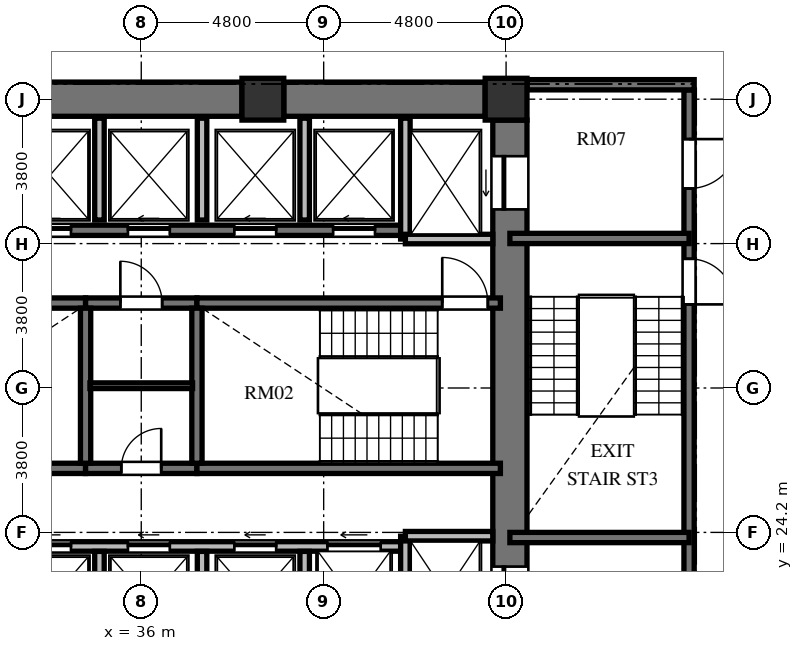
"""IFC4 building model, lengths in metres.
Left out: names, types, materials, properties, quantities, classifications, styles, units other than length and angle.
Written with IfcOpenShell. Run it as: python <this file> out.ifc"""

import sys

from ifc_helpers import new_model, si_unit, direction, frame, frame_2d, origin, origin_2d, place, context, subcontext, project, spatial, rectangle, extrude, element, fill, save


model = new_model("IFC4")
c1 = context("Model", 3, precision=1e-05, world=origin(), true_north=direction((0.0, 1.0)))
c2 = subcontext(c1, "Body", "Model", "MODEL_VIEW")
j1 = project(units=[si_unit("LENGTHUNIT", "METRE"), si_unit("PLANEANGLEUNIT", "RADIAN")], contexts=[c1])
p1 = place(None, origin())
s1 = spatial("IfcSite", under=j1, at=p1, CompositionType="ELEMENT")
p2 = place(p1, origin())
s2 = spatial("IfcBuilding", under=s1, at=p2, CompositionType="ELEMENT")
p3 = place(p2, frame((0.0, 0.0, 58.032)))
s3 = spatial("IfcBuildingStorey", under=s2, at=p3, CompositionType="ELEMENT", Elevation=58.032)
for number, where, z_axis, x_axis in (
    (1, (45.6, 35.6, 0.0), (0.0, 0.0, 1.0), (1.0, 0.0, 0.0)),
    (2, (39.2, 35.6, 0.0), (0.0, 0.0, 1.0), (1.0, 0.0, 0.0)),
):
    element("IfcColumn", number, at=place(p3, frame(where, z_axis=z_axis, x_axis=x_axis)), inside=s3, PredefinedType="COLUMN", context=c2, shape_type="SweptSolid", body=[
        extrude(rectangle(XDim=1.1, YDim=1.1, at=origin_2d()), origin(), (0.0, 0.0, 1.0), 3.648),
    ])
p4 = place(p3, frame((45.7, 20.95, 0.0), z_axis=(0.0, 0.0, 1.0), x_axis=(0.0, 1.0, 0.0)))
e3 = element("IfcWall", 3, at=p4, inside=s3, PredefinedType="SHEAR", context=c2, shape_type="SweptSolid", body=[
    extrude(rectangle(XDim=14.1, YDim=0.9, at=frame_2d((7.05, 0.0))), origin(), (0.0, 0.0, 1.0), 3.648),
])
p5 = place(p4, frame((11.75, 0.0, 0.0)))
e4 = element("IfcOpeningElement", 4, at=p5, cuts=e3, PredefinedType="OPENING", context=c2, shape_type="SweptSolid", body=[
    extrude(rectangle(XDim=1.4, YDim=2.3, at=frame_2d((0.7, 1.15))), frame((0.0, 0.46, 0.0), z_axis=(0.0, -1.0, 0.0), x_axis=(1.0, 0.0, 0.0)), (0.0, 0.0, 1.0), 0.92),
])
p6 = place(p4, frame((0.95, 0.0, 0.0)))
e5 = element("IfcOpeningElement", 5, at=p6, cuts=e3, PredefinedType="OPENING", context=c2, shape_type="SweptSolid", body=[
    extrude(rectangle(XDim=1.4, YDim=2.3, at=frame_2d((0.7, 1.15))), frame((0.0, 0.46, 0.0), z_axis=(0.0, -1.0, 0.0), x_axis=(1.0, 0.0, 0.0)), (0.0, 0.0, 1.0), 0.92),
])
p7 = place(p3, frame((33.35, 35.6, 0.0), z_axis=(0.0, 0.0, 1.0), x_axis=(1.0, 0.0, 0.0)))
e6 = element("IfcWall", 6, at=p7, inside=s3, PredefinedType="SHEAR", context=c2, shape_type="SweptSolid", body=[
    extrude(rectangle(XDim=5.3, YDim=0.9, at=frame_2d((2.65, 0.0))), origin(), (0.0, 0.0, 1.0), 3.648),
])
p8 = place(p3, frame((39.75, 35.6, 0.0), z_axis=(0.0, 0.0, 1.0), x_axis=(1.0, 0.0, 0.0)))
e7 = element("IfcWall", 7, at=p8, inside=s3, PredefinedType="SHEAR", context=c2, shape_type="SweptSolid", body=[
    extrude(rectangle(XDim=5.3, YDim=0.9, at=frame_2d((2.65, 0.0))), origin(), (0.0, 0.0, 1.0), 3.648),
])
p9 = place(p3, frame((26.55, 30.235, 0.0), z_axis=(0.0, 0.0, 1.0), x_axis=(1.0, 0.0, 0.0)))
e8 = element("IfcWall", 8, at=p9, inside=s3, PredefinedType="SHEAR", context=c2, shape_type="SweptSolid", body=[
    extrude(rectangle(XDim=7.985, YDim=0.27, at=frame_2d((3.992, 0.0))), origin(), (0.0, 0.0, 1.0), 3.648),
])
p10 = place(p3, frame((34.535, 30.235, 0.0), z_axis=(0.0, 0.0, 1.0), x_axis=(1.0, 0.0, 0.0)))
e9 = element("IfcWall", 9, at=p10, inside=s3, PredefinedType="SHEAR", context=c2, shape_type="SweptSolid", body=[
    extrude(rectangle(XDim=2.93, YDim=0.27, at=frame_2d((1.465, 0.0))), origin(), (0.0, 0.0, 1.0), 3.648),
])
p11 = place(p10, frame((0.915, 0.0, 0.0)))
e10 = element("IfcOpeningElement", 10, at=p11, cuts=e9, PredefinedType="OPENING", context=c2, shape_type="SweptSolid", body=[
    extrude(rectangle(XDim=1.1, YDim=2.15, at=frame_2d((0.55, 1.075))), frame((0.0, 0.145, 0.0), z_axis=(0.0, -1.0, 0.0), x_axis=(1.0, 0.0, 0.0)), (0.0, 0.0, 1.0), 0.29),
])
p12 = place(p3, frame((37.465, 30.235, 0.0), z_axis=(0.0, 0.0, 1.0), x_axis=(1.0, 0.0, 0.0)))
e11 = element("IfcWall", 11, at=p12, inside=s3, PredefinedType="SHEAR", context=c2, shape_type="SweptSolid", body=[
    extrude(rectangle(XDim=7.985, YDim=0.27, at=frame_2d((3.992, 0.0))), origin(), (0.0, 0.0, 1.0), 3.648),
])
p13 = place(p12, frame((6.455, 0.0, 0.0)))
e12 = element("IfcOpeningElement", 12, at=p13, cuts=e11, PredefinedType="OPENING", context=c2, shape_type="SweptSolid", body=[
    extrude(rectangle(XDim=1.2, YDim=2.15, at=frame_2d((0.6, 1.075))), frame((0.0, 0.145, 0.0), z_axis=(0.0, -1.0, 0.0), x_axis=(1.0, 0.0, 0.0)), (0.0, 0.0, 1.0), 0.29),
])
p14 = place(p3, frame((26.55, 25.885, 0.0), z_axis=(0.0, 0.0, 1.0), x_axis=(1.0, 0.0, 0.0)))
e13 = element("IfcWall", 13, at=p14, inside=s3, PredefinedType="SHEAR", context=c2, shape_type="SweptSolid", body=[
    extrude(rectangle(XDim=7.985, YDim=0.27, at=frame_2d((3.992, 0.0))), origin(), (0.0, 0.0, 1.0), 3.648),
])
p15 = place(p3, frame((34.535, 25.885, 0.0), z_axis=(0.0, 0.0, 1.0), x_axis=(1.0, 0.0, 0.0)))
e14 = element("IfcWall", 14, at=p15, inside=s3, PredefinedType="SHEAR", context=c2, shape_type="SweptSolid", body=[
    extrude(rectangle(XDim=2.93, YDim=0.27, at=frame_2d((1.465, 0.0))), origin(), (0.0, 0.0, 1.0), 3.648),
])
p16 = place(p15, frame((0.94, 0.0, 0.0)))
e15 = element("IfcOpeningElement", 15, at=p16, cuts=e14, PredefinedType="OPENING", context=c2, shape_type="SweptSolid", body=[
    extrude(rectangle(XDim=1.05, YDim=2.15, at=frame_2d((0.525, 1.075))), frame((0.0, 0.145, 0.0), z_axis=(0.0, -1.0, 0.0), x_axis=(1.0, 0.0, 0.0)), (0.0, 0.0, 1.0), 0.29),
])
p17 = place(p3, frame((37.465, 25.885, 0.0), z_axis=(0.0, 0.0, 1.0), x_axis=(1.0, 0.0, 0.0)))
e16 = element("IfcWall", 16, at=p17, inside=s3, PredefinedType="SHEAR", context=c2, shape_type="SweptSolid", body=[
    extrude(rectangle(XDim=7.985, YDim=0.27, at=frame_2d((3.992, 0.0))), origin(), (0.0, 0.0, 1.0), 3.648),
])
for number, where, z_axis, x_axis in (
    (17, (34.535, 26.02, 0.0), (0.0, 0.0, 1.0), (0.0, 1.0, 0.0)),
    (18, (37.465, 26.02, 0.0), (0.0, 0.0, 1.0), (0.0, 1.0, 0.0)),
):
    element("IfcWall", number, at=place(p3, frame(where, z_axis=z_axis, x_axis=x_axis)), inside=s3, PredefinedType="SHEAR", context=c2, shape_type="SweptSolid", body=[
        extrude(rectangle(XDim=4.08, YDim=0.27, at=frame_2d((2.04, 0.0))), origin(), (0.0, 0.0, 1.0), 3.648),
    ])
p18 = place(p3, frame((34.65, 28.06, 0.0), z_axis=(0.0, 0.0, 1.0), x_axis=(1.0, 0.0, 0.0)))
e19 = element("IfcWall", 19, at=p18, inside=s3, PredefinedType="PARTITIONING", context=c2, shape_type="SweptSolid", body=[
    extrude(rectangle(XDim=2.7, YDim=0.15, at=frame_2d((1.35, 0.0))), origin(), (0.0, 0.0, 1.0), 3.428),
])
p19 = place(p3, frame((26.55, 32.15, 0.0), z_axis=(0.0, 0.0, 1.0), x_axis=(1.0, 0.0, 0.0)))
e20 = element("IfcWall", 20, at=p19, inside=s3, PredefinedType="SHEAR", context=c2, shape_type="SweptSolid", body=[
    extrude(rectangle(XDim=16.4, YDim=0.27, at=frame_2d((8.2, 0.0))), origin(), (0.0, 0.0, 1.0), 3.648),
])
p20 = place(p19, frame((1.1, 0.0, 0.0)))
e21 = element("IfcOpeningElement", 21, at=p20, cuts=e20, PredefinedType="OPENING", context=c2, shape_type="SweptSolid", body=[
    extrude(rectangle(XDim=1.1, YDim=2.2, at=frame_2d((0.55, 1.1))), frame((0.0, 0.145, 0.0), z_axis=(0.0, -1.0, 0.0), x_axis=(1.0, 0.0, 0.0)), (0.0, 0.0, 1.0), 0.29),
])
p21 = place(p19, frame((3.7, 0.0, 0.0)))
e22 = element("IfcOpeningElement", 22, at=p21, cuts=e20, PredefinedType="OPENING", context=c2, shape_type="SweptSolid", body=[
    extrude(rectangle(XDim=1.1, YDim=2.2, at=frame_2d((0.55, 1.1))), frame((0.0, 0.145, 0.0), z_axis=(0.0, -1.0, 0.0), x_axis=(1.0, 0.0, 0.0)), (0.0, 0.0, 1.0), 0.29),
])
p22 = place(p19, frame((6.5, 0.0, 0.0)))
e23 = element("IfcOpeningElement", 23, at=p22, cuts=e20, PredefinedType="OPENING", context=c2, shape_type="SweptSolid", body=[
    extrude(rectangle(XDim=1.1, YDim=2.2, at=frame_2d((0.55, 1.1))), frame((0.0, 0.145, 0.0), z_axis=(0.0, -1.0, 0.0), x_axis=(1.0, 0.0, 0.0)), (0.0, 0.0, 1.0), 0.29),
])
p23 = place(p19, frame((9.1, 0.0, 0.0)))
e24 = element("IfcOpeningElement", 24, at=p23, cuts=e20, PredefinedType="OPENING", context=c2, shape_type="SweptSolid", body=[
    extrude(rectangle(XDim=1.1, YDim=2.2, at=frame_2d((0.55, 1.1))), frame((0.0, 0.145, 0.0), z_axis=(0.0, -1.0, 0.0), x_axis=(1.0, 0.0, 0.0)), (0.0, 0.0, 1.0), 0.29),
])
p24 = place(p19, frame((11.9, 0.0, 0.0)))
e25 = element("IfcOpeningElement", 25, at=p24, cuts=e20, PredefinedType="OPENING", context=c2, shape_type="SweptSolid", body=[
    extrude(rectangle(XDim=1.1, YDim=2.2, at=frame_2d((0.55, 1.1))), frame((0.0, 0.145, 0.0), z_axis=(0.0, -1.0, 0.0), x_axis=(1.0, 0.0, 0.0)), (0.0, 0.0, 1.0), 0.29),
])
p25 = place(p19, frame((14.5, 0.0, 0.0)))
e26 = element("IfcOpeningElement", 26, at=p25, cuts=e20, PredefinedType="OPENING", context=c2, shape_type="SweptSolid", body=[
    extrude(rectangle(XDim=1.1, YDim=2.2, at=frame_2d((0.55, 1.1))), frame((0.0, 0.145, 0.0), z_axis=(0.0, -1.0, 0.0), x_axis=(1.0, 0.0, 0.0)), (0.0, 0.0, 1.0), 0.29),
])
p26 = place(p3, frame((26.75, 23.83, 0.0), z_axis=(0.0, 0.0, 1.0), x_axis=(1.0, 0.0, 0.0)))
e27 = element("IfcWall", 27, at=p26, inside=s3, PredefinedType="SOLIDWALL", context=c2, shape_type="SweptSolid", body=[
    extrude(rectangle(XDim=16.2, YDim=0.25, at=frame_2d((8.1, 0.0))), origin(), (0.0, 0.0, 1.0), 3.428),
])
p27 = place(p26, frame((0.9, 0.0, 0.0)))
e28 = element("IfcOpeningElement", 28, at=p27, cuts=e27, PredefinedType="OPENING", context=c2, shape_type="SweptSolid", body=[
    extrude(rectangle(XDim=1.1, YDim=2.2, at=frame_2d((0.55, 1.1))), frame((0.0, 0.135, 0.0), z_axis=(0.0, -1.0, 0.0), x_axis=(1.0, 0.0, 0.0)), (0.0, 0.0, 1.0), 0.27),
])
p28 = place(p26, frame((3.5, 0.0, 0.0)))
e29 = element("IfcOpeningElement", 29, at=p28, cuts=e27, PredefinedType="OPENING", context=c2, shape_type="SweptSolid", body=[
    extrude(rectangle(XDim=1.1, YDim=2.2, at=frame_2d((0.55, 1.1))), frame((0.0, 0.135, 0.0), z_axis=(0.0, -1.0, 0.0), x_axis=(1.0, 0.0, 0.0)), (0.0, 0.0, 1.0), 0.27),
])
p29 = place(p26, frame((6.3, 0.0, 0.0)))
e30 = element("IfcOpeningElement", 30, at=p29, cuts=e27, PredefinedType="OPENING", context=c2, shape_type="SweptSolid", body=[
    extrude(rectangle(XDim=1.1, YDim=2.2, at=frame_2d((0.55, 1.1))), frame((0.0, 0.135, 0.0), z_axis=(0.0, -1.0, 0.0), x_axis=(1.0, 0.0, 0.0)), (0.0, 0.0, 1.0), 0.27),
])
p30 = place(p26, frame((8.9, 0.0, 0.0)))
e31 = element("IfcOpeningElement", 31, at=p30, cuts=e27, PredefinedType="OPENING", context=c2, shape_type="SweptSolid", body=[
    extrude(rectangle(XDim=1.1, YDim=2.2, at=frame_2d((0.55, 1.1))), frame((0.0, 0.135, 0.0), z_axis=(0.0, -1.0, 0.0), x_axis=(1.0, 0.0, 0.0)), (0.0, 0.0, 1.0), 0.27),
])
p31 = place(p26, frame((11.7, 0.0, 0.0)))
e32 = element("IfcOpeningElement", 32, at=p31, cuts=e27, PredefinedType="OPENING", context=c2, shape_type="SweptSolid", body=[
    extrude(rectangle(XDim=1.1, YDim=2.2, at=frame_2d((0.55, 1.1))), frame((0.0, 0.135, 0.0), z_axis=(0.0, -1.0, 0.0), x_axis=(1.0, 0.0, 0.0)), (0.0, 0.0, 1.0), 0.27),
])
p32 = place(p26, frame((14.15, 0.0, 0.0)))
e33 = element("IfcOpeningElement", 33, at=p32, cuts=e27, PredefinedType="OPENING", context=c2, shape_type="SweptSolid", body=[
    extrude(rectangle(XDim=1.4, YDim=2.3, at=frame_2d((0.7, 1.15))), frame((0.0, 0.135, 0.0), z_axis=(0.0, -1.0, 0.0), x_axis=(1.0, 0.0, 0.0)), (0.0, 0.0, 1.0), 0.27),
])
p33 = place(p3, frame((42.95, 31.92, 0.0), z_axis=(0.0, 0.0, 1.0), x_axis=(0.0, 1.0, 0.0)))
e34 = element("IfcWall", 34, at=p33, inside=s3, PredefinedType="SOLIDWALL", context=c2, shape_type="SweptSolid", body=[
    extrude(rectangle(XDim=3.18, YDim=0.25, at=frame_2d((1.59, 0.0))), origin(), (0.0, 0.0, 1.0), 3.428),
])
p34 = place(p3, frame((42.95, 31.92, 0.0), z_axis=(0.0, 0.0, 1.0), x_axis=(1.0, 0.0, 0.0)))
e35 = element("IfcWall", 35, at=p34, inside=s3, PredefinedType="SOLIDWALL", context=c2, shape_type="SweptSolid", body=[
    extrude(rectangle(XDim=2.3, YDim=0.25, at=frame_2d((1.15, 0.0))), origin(), (0.0, 0.0, 1.0), 3.428),
])
p35 = place(p3, frame((42.95, 20.9, 0.0), z_axis=(0.0, 0.0, 1.0), x_axis=(0.0, 1.0, 0.0)))
e36 = element("IfcWall", 36, at=p35, inside=s3, PredefinedType="SOLIDWALL", context=c2, shape_type="SweptSolid", body=[
    extrude(rectangle(XDim=3.2, YDim=0.25, at=frame_2d((1.6, 0.0))), origin(), (0.0, 0.0, 1.0), 3.428),
])
p36 = place(p3, frame((42.95, 24.1, 0.0), z_axis=(0.0, 0.0, 1.0), x_axis=(1.0, 0.0, 0.0)))
e37 = element("IfcWall", 37, at=p36, inside=s3, PredefinedType="SOLIDWALL", context=c2, shape_type="SweptSolid", body=[
    extrude(rectangle(XDim=2.3, YDim=0.25, at=frame_2d((1.15, 0.0))), origin(), (0.0, 0.0, 1.0), 3.428),
])
p37 = place(p3, frame((34.9, 32.42, 0.0), z_axis=(0.0, 0.0, 1.0), x_axis=(0.0, 1.0, 0.0)))
e38 = element("IfcWall", 38, at=p37, inside=s3, PredefinedType="SOLIDWALL", context=c2, shape_type="SweptSolid", body=[
    extrude(rectangle(XDim=2.68, YDim=0.25, at=frame_2d((1.34, 0.0))), origin(), (0.0, 0.0, 1.0), 3.428),
])
p38 = place(p3, frame((34.9, 20.9, 0.0), z_axis=(0.0, 0.0, 1.0), x_axis=(0.0, 1.0, 0.0)))
e39 = element("IfcWall", 39, at=p38, inside=s3, PredefinedType="SOLIDWALL", context=c2, shape_type="SweptSolid", body=[
    extrude(rectangle(XDim=2.8, YDim=0.25, at=frame_2d((1.4, 0.0))), origin(), (0.0, 0.0, 1.0), 3.428),
])
p39 = place(p3, frame((37.6, 32.42, 0.0), z_axis=(0.0, 0.0, 1.0), x_axis=(0.0, 1.0, 0.0)))
e40 = element("IfcWall", 40, at=p39, inside=s3, PredefinedType="SOLIDWALL", context=c2, shape_type="SweptSolid", body=[
    extrude(rectangle(XDim=2.68, YDim=0.25, at=frame_2d((1.34, 0.0))), origin(), (0.0, 0.0, 1.0), 3.428),
])
p40 = place(p3, frame((37.6, 20.9, 0.0), z_axis=(0.0, 0.0, 1.0), x_axis=(0.0, 1.0, 0.0)))
e41 = element("IfcWall", 41, at=p40, inside=s3, PredefinedType="SOLIDWALL", context=c2, shape_type="SweptSolid", body=[
    extrude(rectangle(XDim=2.8, YDim=0.25, at=frame_2d((1.4, 0.0))), origin(), (0.0, 0.0, 1.0), 3.428),
])
p41 = place(p3, frame((40.3, 32.42, 0.0), z_axis=(0.0, 0.0, 1.0), x_axis=(0.0, 1.0, 0.0)))
e42 = element("IfcWall", 42, at=p41, inside=s3, PredefinedType="SOLIDWALL", context=c2, shape_type="SweptSolid", body=[
    extrude(rectangle(XDim=2.68, YDim=0.25, at=frame_2d((1.34, 0.0))), origin(), (0.0, 0.0, 1.0), 3.428),
])
p42 = place(p3, frame((40.3, 20.9, 0.0), z_axis=(0.0, 0.0, 1.0), x_axis=(0.0, 1.0, 0.0)))
e43 = element("IfcWall", 43, at=p42, inside=s3, PredefinedType="SOLIDWALL", context=c2, shape_type="SweptSolid", body=[
    extrude(rectangle(XDim=2.8, YDim=0.25, at=frame_2d((1.4, 0.0))), origin(), (0.0, 0.0, 1.0), 3.428),
])
p43 = place(p3, frame((50.415, 35.845, 0.0), z_axis=(0.0, 0.0, 1.0), x_axis=(0.0, -1.0, 0.0)))
e44 = element("IfcWall", 44, at=p43, inside=s3, PredefinedType="SHEAR", context=c2, shape_type="SweptSolid", body=[
    extrude(rectangle(XDim=15.825, YDim=0.27, at=frame_2d((7.913, 0.0))), origin(), (0.0, 0.0, 1.0), 3.648),
])
p44 = place(p43, frame((4.445, 0.0, 0.0)))
e45 = element("IfcOpeningElement", 45, at=p44, cuts=e44, PredefinedType="OPENING", context=c2, shape_type="SweptSolid", body=[
    extrude(rectangle(XDim=1.2, YDim=2.15, at=frame_2d((0.6, 1.075))), frame((0.0, 0.145, 0.0), z_axis=(0.0, -1.0, 0.0), x_axis=(1.0, 0.0, 0.0)), (0.0, 0.0, 1.0), 0.29),
])
p45 = place(p43, frame((1.295, 0.0, 0.0)))
e46 = element("IfcOpeningElement", 46, at=p45, cuts=e44, PredefinedType="OPENING", context=c2, shape_type="SweptSolid", body=[
    extrude(rectangle(XDim=1.3, YDim=2.2, at=frame_2d((0.65, 1.1))), frame((0.0, 0.145, 0.0), z_axis=(0.0, -1.0, 0.0), x_axis=(1.0, 0.0, 0.0)), (0.0, 0.0, 1.0), 0.29),
])
p46 = place(p43, frame((13.095, 0.0, 0.0)))
e47 = element("IfcOpeningElement", 47, at=p46, cuts=e44, PredefinedType="OPENING", context=c2, shape_type="SweptSolid", body=[
    extrude(rectangle(XDim=1.3, YDim=2.2, at=frame_2d((0.65, 1.1))), frame((0.0, 0.145, 0.0), z_axis=(0.0, -1.0, 0.0), x_axis=(1.0, 0.0, 0.0)), (0.0, 0.0, 1.0), 0.29),
])
p47 = place(p3, frame((46.15, 35.98, 0.0), z_axis=(0.0, 0.0, 1.0), x_axis=(1.0, 0.0, 0.0)))
e48 = element("IfcWall", 48, at=p47, inside=s3, PredefinedType="SHEAR", context=c2, shape_type="SweptSolid", body=[
    extrude(rectangle(XDim=4.4, YDim=0.27, at=frame_2d((2.2, 0.0))), origin(), (0.0, 0.0, 1.0), 3.648),
])
for number, where, z_axis, x_axis in (
    (49, (45.7, 31.935, 0.0), (0.0, 0.0, 1.0), (1.0, 0.0, 0.0)),
    (50, (45.7, 24.065, 0.0), (0.0, 0.0, 1.0), (1.0, 0.0, 0.0)),
):
    element("IfcWall", number, at=place(p3, frame(where, z_axis=z_axis, x_axis=x_axis)), inside=s3, PredefinedType="SHEAR", context=c2, shape_type="SweptSolid", body=[
        extrude(rectangle(XDim=4.715, YDim=0.27, at=frame_2d((2.357, 0.0))), origin(), (0.0, 0.0, 1.0), 3.648),
    ])
p48 = place(p13, origin())
e51 = element("IfcDoor", 51, at=p48, inside=s3, OperationType="SINGLE_SWING_LEFT", PredefinedType="DOOR", context=c2, shape_type="SweptSolid", body=[
    extrude(rectangle(XDim=1.2, YDim=2.15, at=frame_2d((0.6, 1.075))), frame((0.0, 0.025, 0.0), z_axis=(0.0, -1.0, 0.0), x_axis=(1.0, 0.0, 0.0)), (0.0, 0.0, 1.0), 0.05),
])
fill(e12, e51)
p49 = place(p16, origin())
e52 = element("IfcDoor", 52, at=p49, inside=s3, OperationType="SINGLE_SWING_RIGHT", PredefinedType="DOOR", context=c2, shape_type="SweptSolid", body=[
    extrude(rectangle(XDim=1.05, YDim=2.15, at=frame_2d((0.525, 1.075))), frame((0.0, 0.025, 0.0), z_axis=(0.0, -1.0, 0.0), x_axis=(1.0, 0.0, 0.0)), (0.0, 0.0, 1.0), 0.05),
])
fill(e15, e52)
p50 = place(p11, origin())
e53 = element("IfcDoor", 53, at=p50, inside=s3, OperationType="SINGLE_SWING_LEFT", PredefinedType="DOOR", context=c2, shape_type="SweptSolid", body=[
    extrude(rectangle(XDim=1.1, YDim=2.15, at=frame_2d((0.55, 1.075))), frame((0.0, 0.025, 0.0), z_axis=(0.0, -1.0, 0.0), x_axis=(1.0, 0.0, 0.0)), (0.0, 0.0, 1.0), 0.05),
])
fill(e10, e53)
p51 = place(p22, origin())
e54 = element("IfcDoor", 54, at=p51, inside=s3, OperationType="SLIDING_TO_LEFT", PredefinedType="DOOR", context=c2, shape_type="SweptSolid", body=[
    extrude(rectangle(XDim=1.1, YDim=2.2, at=frame_2d((0.55, 1.1))), frame((0.0, 0.025, 0.0), z_axis=(0.0, -1.0, 0.0), x_axis=(1.0, 0.0, 0.0)), (0.0, 0.0, 1.0), 0.05),
])
fill(e23, e54)
p52 = place(p23, origin())
e55 = element("IfcDoor", 55, at=p52, inside=s3, OperationType="SLIDING_TO_LEFT", PredefinedType="DOOR", context=c2, shape_type="SweptSolid", body=[
    extrude(rectangle(XDim=1.1, YDim=2.2, at=frame_2d((0.55, 1.1))), frame((0.0, 0.025, 0.0), z_axis=(0.0, -1.0, 0.0), x_axis=(1.0, 0.0, 0.0)), (0.0, 0.0, 1.0), 0.05),
])
fill(e24, e55)
p53 = place(p29, origin())
e56 = element("IfcDoor", 56, at=p53, inside=s3, OperationType="SLIDING_TO_LEFT", PredefinedType="DOOR", context=c2, shape_type="SweptSolid", body=[
    extrude(rectangle(XDim=1.1, YDim=2.2, at=frame_2d((0.55, 1.1))), frame((0.0, 0.025, 0.0), z_axis=(0.0, -1.0, 0.0), x_axis=(1.0, 0.0, 0.0)), (0.0, 0.0, 1.0), 0.05),
])
fill(e30, e56)
p54 = place(p30, origin())
e57 = element("IfcDoor", 57, at=p54, inside=s3, OperationType="SLIDING_TO_LEFT", PredefinedType="DOOR", context=c2, shape_type="SweptSolid", body=[
    extrude(rectangle(XDim=1.1, YDim=2.2, at=frame_2d((0.55, 1.1))), frame((0.0, 0.025, 0.0), z_axis=(0.0, -1.0, 0.0), x_axis=(1.0, 0.0, 0.0)), (0.0, 0.0, 1.0), 0.05),
])
fill(e31, e57)
p55 = place(p24, origin())
e58 = element("IfcDoor", 58, at=p55, inside=s3, OperationType="SLIDING_TO_LEFT", PredefinedType="DOOR", context=c2, shape_type="SweptSolid", body=[
    extrude(rectangle(XDim=1.1, YDim=2.2, at=frame_2d((0.55, 1.1))), frame((0.0, 0.025, 0.0), z_axis=(0.0, -1.0, 0.0), x_axis=(1.0, 0.0, 0.0)), (0.0, 0.0, 1.0), 0.05),
])
fill(e25, e58)
p56 = place(p25, origin())
e59 = element("IfcDoor", 59, at=p56, inside=s3, OperationType="SLIDING_TO_LEFT", PredefinedType="DOOR", context=c2, shape_type="SweptSolid", body=[
    extrude(rectangle(XDim=1.1, YDim=2.2, at=frame_2d((0.55, 1.1))), frame((0.0, 0.025, 0.0), z_axis=(0.0, -1.0, 0.0), x_axis=(1.0, 0.0, 0.0)), (0.0, 0.0, 1.0), 0.05),
])
fill(e26, e59)
p57 = place(p31, origin())
e60 = element("IfcDoor", 60, at=p57, inside=s3, OperationType="SLIDING_TO_LEFT", PredefinedType="DOOR", context=c2, shape_type="SweptSolid", body=[
    extrude(rectangle(XDim=1.1, YDim=2.2, at=frame_2d((0.55, 1.1))), frame((0.0, 0.025, 0.0), z_axis=(0.0, -1.0, 0.0), x_axis=(1.0, 0.0, 0.0)), (0.0, 0.0, 1.0), 0.05),
])
fill(e32, e60)
p58 = place(p5, origin())
e61 = element("IfcDoor", 61, at=p58, inside=s3, OperationType="SLIDING_TO_LEFT", PredefinedType="DOOR", context=c2, shape_type="SweptSolid", body=[
    extrude(rectangle(XDim=1.4, YDim=2.3, at=frame_2d((0.7, 1.15))), frame((0.0, 0.025, 0.0), z_axis=(0.0, -1.0, 0.0), x_axis=(1.0, 0.0, 0.0)), (0.0, 0.0, 1.0), 0.05),
])
fill(e4, e61)
p59 = place(p6, origin())
e62 = element("IfcDoor", 62, at=p59, inside=s3, OperationType="SLIDING_TO_LEFT", PredefinedType="DOOR", context=c2, shape_type="SweptSolid", body=[
    extrude(rectangle(XDim=1.4, YDim=2.3, at=frame_2d((0.7, 1.15))), frame((0.0, 0.025, 0.0), z_axis=(0.0, -1.0, 0.0), x_axis=(1.0, 0.0, 0.0)), (0.0, 0.0, 1.0), 0.05),
])
fill(e5, e62)
p60 = place(p32, origin())
e63 = element("IfcDoor", 63, at=p60, inside=s3, OperationType="SLIDING_TO_LEFT", PredefinedType="DOOR", context=c2, shape_type="SweptSolid", body=[
    extrude(rectangle(XDim=1.4, YDim=2.3, at=frame_2d((0.7, 1.15))), frame((0.0, 0.025, 0.0), z_axis=(0.0, -1.0, 0.0), x_axis=(1.0, 0.0, 0.0)), (0.0, 0.0, 1.0), 0.05),
])
fill(e33, e63)
p61 = place(p44, origin())
e64 = element("IfcDoor", 64, at=p61, inside=s3, OperationType="SINGLE_SWING_RIGHT", PredefinedType="DOOR", context=c2, shape_type="SweptSolid", body=[
    extrude(rectangle(XDim=1.2, YDim=2.15, at=frame_2d((0.6, 1.075))), frame((0.0, 0.025, 0.0), z_axis=(0.0, -1.0, 0.0), x_axis=(1.0, 0.0, 0.0)), (0.0, 0.0, 1.0), 0.05),
])
fill(e45, e64)
p62 = place(p45, origin())
e65 = element("IfcDoor", 65, at=p62, inside=s3, OperationType="SINGLE_SWING_LEFT", PredefinedType="DOOR", context=c2, shape_type="SweptSolid", body=[
    extrude(rectangle(XDim=1.3, YDim=2.2, at=frame_2d((0.65, 1.1))), frame((0.0, 0.025, 0.0), z_axis=(0.0, -1.0, 0.0), x_axis=(1.0, 0.0, 0.0)), (0.0, 0.0, 1.0), 0.05),
])
fill(e46, e65)
save(model, sys.argv[1])
